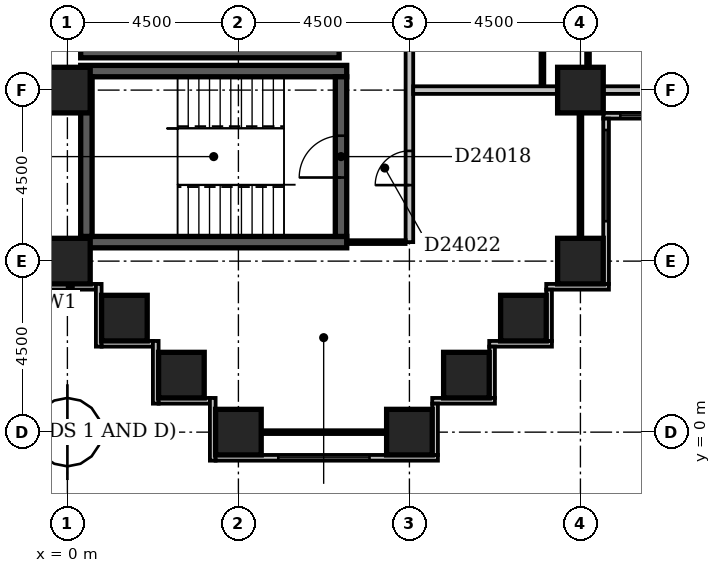
"""IFC4 building model, lengths in metres.
Left out: names, types, materials, properties, quantities, classifications, styles, units other than length and angle.
Written with IfcOpenShell. Run it as: python <this file> out.ifc"""

import sys

from ifc_helpers import new_model, si_unit, direction, frame, frame_2d, origin, origin_2d, place, context, subcontext, project, spatial, rectangle, extrude, element, fill, save


model = new_model("IFC4")
c1 = context("Model", 3, precision=1e-05, world=origin(), true_north=direction((0.0, 1.0)))
c2 = subcontext(c1, "Body", "Model", "MODEL_VIEW")
j1 = project(units=[si_unit("LENGTHUNIT", "METRE"), si_unit("PLANEANGLEUNIT", "RADIAN")], contexts=[c1])
p1 = place(None, origin())
s1 = spatial("IfcSite", under=j1, at=p1, CompositionType="ELEMENT")
p2 = place(p1, origin())
s2 = spatial("IfcBuilding", under=s1, at=p2, CompositionType="ELEMENT")
p3 = place(p2, frame((0.0, 0.0, 97.4)))
s3 = spatial("IfcBuildingStorey", under=s2, at=p3, CompositionType="ELEMENT", Elevation=97.4)
for number, where, z_axis, x_axis in (
    (1, (0.35, 5.0, -0.3), (0.0, 0.0, 1.0), (1.0, 0.0, 0.0)),
    (2, (0.35, 9.5, -0.3), (0.0, 0.0, 1.0), (1.0, 0.0, 0.0)),
):
    element("IfcWall", number, at=place(p3, frame(where, z_axis=z_axis, x_axis=x_axis)), inside=s3, PredefinedType="SHEAR", context=c2, shape_type="SweptSolid", body=[
        extrude(rectangle(XDim=7.0, YDim=0.3, at=frame_2d((3.5, 0.0))), origin(), (0.0, 0.0, 1.0), 3.6),
    ])
p4 = place(p3, frame((0.35, 10.0, -0.3), z_axis=(0.0, 0.0, 1.0), x_axis=(1.0, 0.0, 0.0)))
e3 = element("IfcWall", 3, at=p4, inside=s3, PredefinedType="SHEAR", context=c2, shape_type="SweptSolid", body=[
    extrude(rectangle(XDim=6.8, YDim=0.3, at=frame_2d((3.4, 0.0))), origin(), (0.0, 0.0, 1.0), 3.6),
])
p5 = place(p3, frame((0.5, 5.15, -0.3), z_axis=(0.0, 0.0, 1.0), x_axis=(0.0, 1.0, 0.0)))
e4 = element("IfcWall", 4, at=p5, inside=s3, PredefinedType="SHEAR", context=c2, shape_type="SweptSolid", body=[
    extrude(rectangle(XDim=4.2, YDim=0.3, at=frame_2d((2.1, 0.0))), origin(), (0.0, 0.0, 1.0), 3.6),
])
p6 = place(p3, frame((7.2, 5.15, -0.3), z_axis=(0.0, 0.0, 1.0), x_axis=(0.0, 1.0, 0.0)))
e5 = element("IfcWall", 5, at=p6, inside=s3, PredefinedType="SHEAR", context=c2, shape_type="SweptSolid", body=[
    extrude(rectangle(XDim=4.2, YDim=0.3, at=frame_2d((2.1, 0.0))), origin(), (0.0, 0.0, 1.0), 3.6),
])
p7 = place(p6, frame((1.55, 0.0, 0.3)))
e6 = element("IfcOpeningElement", 6, at=p7, cuts=e5, PredefinedType="OPENING", context=c2, shape_type="SweptSolid", body=[
    extrude(rectangle(XDim=1.1, YDim=2.1, at=frame_2d((0.55, 1.05))), frame((0.0, 0.162, 0.0), z_axis=(0.0, -1.0, 0.0), x_axis=(1.0, 0.0, 0.0)), (0.0, 0.0, 1.0), 0.324),
])
for number, where, z_axis, x_axis in (
    (7, (4.5, 0.0, -0.3), (0.0, 0.0, 1.0), (1.0, 0.0, 0.0)),
    (8, (9.0, 0.0, -0.3), (0.0, 0.0, 1.0), (1.0, 0.0, 0.0)),
    (9, (3.0, 1.5, -0.3), (0.0, 0.0, 1.0), (1.0, 0.0, 0.0)),
    (10, (10.5, 1.5, -0.3), (0.0, 0.0, 1.0), (1.0, 0.0, 0.0)),
    (11, (1.5, 3.0, -0.3), (0.0, 0.0, 1.0), (1.0, 0.0, 0.0)),
    (12, (12.0, 3.0, -0.3), (0.0, 0.0, 1.0), (1.0, 0.0, 0.0)),
    (13, (0.0, 4.5, -0.3), (0.0, 0.0, 1.0), (1.0, 0.0, 0.0)),
    (14, (13.5, 4.5, -0.3), (0.0, 0.0, 1.0), (1.0, 0.0, 0.0)),
    (15, (0.0, 9.0, -0.3), (0.0, 0.0, 1.0), (1.0, 0.0, 0.0)),
    (16, (13.5, 9.0, -0.3), (0.0, 0.0, 1.0), (1.0, 0.0, 0.0)),
):
    element("IfcColumn", number, at=place(p3, frame(where, z_axis=z_axis, x_axis=x_axis)), inside=s3, PredefinedType="COLUMN", context=c2, shape_type="SweptSolid", body=[
        extrude(rectangle(XDim=1.2, YDim=1.2, at=origin_2d()), origin(), (0.0, 0.0, 1.0), 3.6),
    ])
p8 = place(p3, frame((9.675, -0.6, 0.0), z_axis=(0.0, 0.0, 1.0), x_axis=(0.0, 1.0, 0.0)))
e17 = element("IfcWall", 17, at=p8, inside=s3, PredefinedType="STANDARD", context=c2, shape_type="SweptSolid", body=[
    extrude(rectangle(XDim=1.35, YDim=0.15, at=frame_2d((0.675, 0.0))), origin(), (0.0, 0.0, 1.0), 2.7),
])
p9 = place(p3, frame((9.6, 0.825, 0.0), z_axis=(0.0, 0.0, 1.0), x_axis=(1.0, 0.0, 0.0)))
e18 = element("IfcWall", 18, at=p9, inside=s3, PredefinedType="STANDARD", context=c2, shape_type="SweptSolid", body=[
    extrude(rectangle(XDim=1.65, YDim=0.15, at=frame_2d((0.825, 0.0))), origin(), (0.0, 0.0, 1.0), 2.7),
])
p10 = place(p3, frame((11.175, 0.9, 0.0), z_axis=(0.0, 0.0, 1.0), x_axis=(0.0, 1.0, 0.0)))
e19 = element("IfcWall", 19, at=p10, inside=s3, PredefinedType="STANDARD", context=c2, shape_type="SweptSolid", body=[
    extrude(rectangle(XDim=1.35, YDim=0.15, at=frame_2d((0.675, 0.0))), origin(), (0.0, 0.0, 1.0), 2.7),
])
p11 = place(p3, frame((11.1, 2.325, 0.0), z_axis=(0.0, 0.0, 1.0), x_axis=(1.0, 0.0, 0.0)))
e20 = element("IfcWall", 20, at=p11, inside=s3, PredefinedType="STANDARD", context=c2, shape_type="SweptSolid", body=[
    extrude(rectangle(XDim=1.65, YDim=0.15, at=frame_2d((0.825, 0.0))), origin(), (0.0, 0.0, 1.0), 2.7),
])
p12 = place(p3, frame((12.675, 2.4, 0.0), z_axis=(0.0, 0.0, 1.0), x_axis=(0.0, 1.0, 0.0)))
e21 = element("IfcWall", 21, at=p12, inside=s3, PredefinedType="STANDARD", context=c2, shape_type="SweptSolid", body=[
    extrude(rectangle(XDim=1.35, YDim=0.15, at=frame_2d((0.675, 0.0))), origin(), (0.0, 0.0, 1.0), 2.7),
])
p13 = place(p3, frame((12.6, 3.825, 0.0), z_axis=(0.0, 0.0, 1.0), x_axis=(1.0, 0.0, 0.0)))
e22 = element("IfcWall", 22, at=p13, inside=s3, PredefinedType="STANDARD", context=c2, shape_type="SweptSolid", body=[
    extrude(rectangle(XDim=1.65, YDim=0.15, at=frame_2d((0.825, 0.0))), origin(), (0.0, 0.0, 1.0), 2.7),
])
p14 = place(p3, frame((14.175, 3.9, 0.0), z_axis=(0.0, 0.0, 1.0), x_axis=(0.0, 1.0, 0.0)))
e23 = element("IfcWall", 23, at=p14, inside=s3, PredefinedType="STANDARD", context=c2, shape_type="SweptSolid", body=[
    extrude(rectangle(XDim=4.35, YDim=0.15, at=frame_2d((2.175, 0.0))), origin(), (0.0, 0.0, 1.0), 2.7),
])
p15 = place(p14, frame((1.65, 0.0, 0.6)))
e24 = element("IfcOpeningElement", 24, at=p15, cuts=e23, PredefinedType="OPENING", context=c2, shape_type="SweptSolid", body=[
    extrude(rectangle(XDim=2.4, YDim=1.8, at=frame_2d((1.2, 0.9))), frame((0.0, 0.087, 0.0), z_axis=(0.0, -1.0, 0.0), x_axis=(1.0, 0.0, 0.0)), (0.0, 0.0, 1.0), 0.174),
])
p16 = place(p3, frame((14.1, 8.325, 0.0), z_axis=(0.0, 0.0, 1.0), x_axis=(1.0, 0.0, 0.0)))
e25 = element("IfcWall", 25, at=p16, inside=s3, PredefinedType="STANDARD", context=c2, shape_type="SweptSolid", body=[
    extrude(rectangle(XDim=4.65, YDim=0.15, at=frame_2d((2.325, 0.0))), origin(), (0.0, 0.0, 1.0), 2.7),
])
p17 = place(p16, frame((0.45, 0.0, 0.6)))
e26 = element("IfcOpeningElement", 26, at=p17, cuts=e25, PredefinedType="OPENING", context=c2, shape_type="SweptSolid", body=[
    extrude(rectangle(XDim=2.4, YDim=1.8, at=frame_2d((1.2, 0.9))), frame((0.0, 0.087, 0.0), z_axis=(0.0, -1.0, 0.0), x_axis=(1.0, 0.0, 0.0)), (0.0, 0.0, 1.0), 0.174),
])
p18 = place(p3, frame((-0.6, 3.825, 0.0), z_axis=(0.0, 0.0, 1.0), x_axis=(1.0, 0.0, 0.0)))
e27 = element("IfcWall", 27, at=p18, inside=s3, PredefinedType="STANDARD", context=c2, shape_type="SweptSolid", body=[
    extrude(rectangle(XDim=1.35, YDim=0.15, at=frame_2d((0.675, 0.0))), origin(), (0.0, 0.0, 1.0), 2.7),
])
p19 = place(p3, frame((0.825, 3.9, 0.0), z_axis=(0.0, 0.0, 1.0), x_axis=(0.0, -1.0, 0.0)))
e28 = element("IfcWall", 28, at=p19, inside=s3, PredefinedType="STANDARD", context=c2, shape_type="SweptSolid", body=[
    extrude(rectangle(XDim=1.65, YDim=0.15, at=frame_2d((0.825, 0.0))), origin(), (0.0, 0.0, 1.0), 2.7),
])
p20 = place(p3, frame((0.9, 2.325, 0.0), z_axis=(0.0, 0.0, 1.0), x_axis=(1.0, 0.0, 0.0)))
e29 = element("IfcWall", 29, at=p20, inside=s3, PredefinedType="STANDARD", context=c2, shape_type="SweptSolid", body=[
    extrude(rectangle(XDim=1.35, YDim=0.15, at=frame_2d((0.675, 0.0))), origin(), (0.0, 0.0, 1.0), 2.7),
])
p21 = place(p3, frame((2.325, 2.4, 0.0), z_axis=(0.0, 0.0, 1.0), x_axis=(0.0, -1.0, 0.0)))
e30 = element("IfcWall", 30, at=p21, inside=s3, PredefinedType="STANDARD", context=c2, shape_type="SweptSolid", body=[
    extrude(rectangle(XDim=1.65, YDim=0.15, at=frame_2d((0.825, 0.0))), origin(), (0.0, 0.0, 1.0), 2.7),
])
p22 = place(p3, frame((2.4, 0.825, 0.0), z_axis=(0.0, 0.0, 1.0), x_axis=(1.0, 0.0, 0.0)))
e31 = element("IfcWall", 31, at=p22, inside=s3, PredefinedType="STANDARD", context=c2, shape_type="SweptSolid", body=[
    extrude(rectangle(XDim=1.35, YDim=0.15, at=frame_2d((0.675, 0.0))), origin(), (0.0, 0.0, 1.0), 2.7),
])
p23 = place(p3, frame((3.825, 0.9, 0.0), z_axis=(0.0, 0.0, 1.0), x_axis=(0.0, -1.0, 0.0)))
e32 = element("IfcWall", 32, at=p23, inside=s3, PredefinedType="STANDARD", context=c2, shape_type="SweptSolid", body=[
    extrude(rectangle(XDim=1.65, YDim=0.15, at=frame_2d((0.825, 0.0))), origin(), (0.0, 0.0, 1.0), 2.7),
])
p24 = place(p3, frame((3.9, -0.675, 0.0), z_axis=(0.0, 0.0, 1.0), x_axis=(1.0, 0.0, 0.0)))
e33 = element("IfcWall", 33, at=p24, inside=s3, PredefinedType="STANDARD", context=c2, shape_type="SweptSolid", body=[
    extrude(rectangle(XDim=5.85, YDim=0.15, at=frame_2d((2.925, 0.0))), origin(), (0.0, 0.0, 1.0), 2.7),
])
p25 = place(p24, frame((1.65, 0.0, 0.6)))
e34 = element("IfcOpeningElement", 34, at=p25, cuts=e33, PredefinedType="OPENING", context=c2, shape_type="SweptSolid", body=[
    extrude(rectangle(XDim=2.4, YDim=1.8, at=frame_2d((1.2, 0.9))), frame((0.0, 0.087, 0.0), z_axis=(0.0, -1.0, 0.0), x_axis=(1.0, 0.0, 0.0)), (0.0, 0.0, 1.0), 0.174),
])
p26 = place(p3, frame((5.1, 0.0, 0.0), z_axis=(0.0, 0.0, 1.0), x_axis=(1.0, 0.0, 0.0)))
e35 = element("IfcWall", 35, at=p26, inside=s3, PredefinedType="PARTITIONING", context=c2, shape_type="SweptSolid", body=[
    extrude(rectangle(XDim=3.3, YDim=0.1, at=frame_2d((1.65, 0.0))), origin(), (0.0, 0.0, 1.0), 2.7),
])
p27 = place(p3, frame((0.0, 4.4, 0.0), z_axis=(0.0, 0.0, 1.0), x_axis=(0.0, 1.0, 0.0)))
e36 = element("IfcWall", 36, at=p27, inside=s3, PredefinedType="PARTITIONING", context=c2, shape_type="SweptSolid", body=[
    extrude(rectangle(XDim=0.7, YDim=0.1, at=frame_2d((0.35, 0.0))), origin(), (0.0, 0.0, 1.0), 2.7),
])
p28 = place(p3, frame((7.349, 5.0, 0.0), z_axis=(0.0, 0.0, 1.0), x_axis=(1.0, 0.0, 0.0)))
e37 = element("IfcWall", 37, at=p28, inside=s3, PredefinedType="PARTITIONING", context=c2, shape_type="SweptSolid", body=[
    extrude(rectangle(XDim=1.551, YDim=0.1, at=frame_2d((0.775, 0.0))), origin(), (0.0, 0.0, 1.0), 3.3),
])
p29 = place(p3, frame((9.0, 5.0, 0.0), z_axis=(0.0, 0.0, 1.0), x_axis=(0.0, 1.0, 0.0)))
e38 = element("IfcWall", 38, at=p29, inside=s3, PredefinedType="PARTITIONING", context=c2, shape_type="SweptSolid", body=[
    extrude(rectangle(XDim=44.5, YDim=0.2, at=frame_2d((22.25, 0.0))), origin(), (0.0, 0.0, 1.0), 3.3),
])
p30 = place(p29, frame((18.4, 0.0, 0.0)))
e39 = element("IfcOpeningElement", 39, at=p30, cuts=e38, PredefinedType="OPENING", context=c2, shape_type="SweptSolid", body=[
    extrude(rectangle(XDim=1.0, YDim=2.1, at=frame_2d((0.5, 1.05))), frame((0.0, 0.112, 0.0), z_axis=(0.0, -1.0, 0.0), x_axis=(1.0, 0.0, 0.0)), (0.0, 0.0, 1.0), 0.224),
])
p31 = place(p29, frame((11.7, 0.0, 0.0)))
e40 = element("IfcOpeningElement", 40, at=p31, cuts=e38, PredefinedType="OPENING", context=c2, shape_type="SweptSolid", body=[
    extrude(rectangle(XDim=1.0, YDim=2.1, at=frame_2d((0.5, 1.05))), frame((0.0, 0.112, 0.0), z_axis=(0.0, -1.0, 0.0), x_axis=(1.0, 0.0, 0.0)), (0.0, 0.0, 1.0), 0.224),
])
p32 = place(p29, frame((37.25, 0.0, 0.0)))
e41 = element("IfcOpeningElement", 41, at=p32, cuts=e38, PredefinedType="OPENING", context=c2, shape_type="SweptSolid", body=[
    extrude(rectangle(XDim=0.9, YDim=2.1, at=frame_2d((0.45, 1.05))), frame((0.0, 0.112, 0.0), z_axis=(0.0, -1.0, 0.0), x_axis=(1.0, 0.0, 0.0)), (0.0, 0.0, 1.0), 0.224),
])
p33 = place(p29, frame((1.5, 0.0, 0.0)))
e42 = element("IfcOpeningElement", 42, at=p33, cuts=e38, PredefinedType="OPENING", context=c2, shape_type="SweptSolid", body=[
    extrude(rectangle(XDim=0.9, YDim=2.1, at=frame_2d((0.45, 1.05))), frame((0.0, 0.112, 0.0), z_axis=(0.0, -1.0, 0.0), x_axis=(1.0, 0.0, 0.0)), (0.0, 0.0, 1.0), 0.224),
])
p34 = place(p3, frame((13.5, 5.1, 0.0), z_axis=(0.0, 0.0, 1.0), x_axis=(0.0, 1.0, 0.0)))
e43 = element("IfcWall", 43, at=p34, inside=s3, PredefinedType="PARTITIONING", context=c2, shape_type="SweptSolid", body=[
    extrude(rectangle(XDim=3.3, YDim=0.1, at=frame_2d((1.65, 0.0))), origin(), (0.0, 0.0, 1.0), 2.7),
])
p35 = place(p3, frame((9.1, 9.0, 0.0), z_axis=(0.0, 0.0, 1.0), x_axis=(1.0, 0.0, 0.0)))
e44 = element("IfcWall", 44, at=p35, inside=s3, PredefinedType="PARTITIONING", context=c2, shape_type="SweptSolid", body=[
    extrude(rectangle(XDim=3.8, YDim=0.2, at=frame_2d((1.9, 0.0))), origin(), (0.0, 0.0, 1.0), 3.3),
])
p36 = place(p3, frame((14.1, 9.0, 0.0), z_axis=(0.0, 0.0, 1.0), x_axis=(1.0, 0.0, 0.0)))
e45 = element("IfcWall", 45, at=p36, inside=s3, PredefinedType="PARTITIONING", context=c2, shape_type="SweptSolid", body=[
    extrude(rectangle(XDim=3.3, YDim=0.2, at=frame_2d((1.65, 0.0))), origin(), (0.0, 0.0, 1.0), 2.7),
])
p37 = place(p3, frame((12.5, 9.1, 0.0), z_axis=(0.0, 0.0, 1.0), x_axis=(0.0, 1.0, 0.0)))
e46 = element("IfcWall", 46, at=p37, inside=s3, PredefinedType="PARTITIONING", context=c2, shape_type="SweptSolid", body=[
    extrude(rectangle(XDim=7.3, YDim=0.1, at=frame_2d((3.65, 0.0))), origin(), (0.0, 0.0, 1.0), 3.3),
])
p38 = place(p37, frame((5.7, 0.0, 0.0)))
e47 = element("IfcOpeningElement", 47, at=p38, cuts=e46, PredefinedType="OPENING", context=c2, shape_type="SweptSolid", body=[
    extrude(rectangle(XDim=0.8, YDim=2.1, at=frame_2d((0.4, 1.05))), frame((0.0, 0.062, 0.0), z_axis=(0.0, -1.0, 0.0), x_axis=(1.0, 0.0, 0.0)), (0.0, 0.0, 1.0), 0.124),
])
p39 = place(p37, frame((1.95, 0.0, 0.0)))
e48 = element("IfcOpeningElement", 48, at=p39, cuts=e46, PredefinedType="OPENING", context=c2, shape_type="SweptSolid", body=[
    extrude(rectangle(XDim=0.9, YDim=2.1, at=frame_2d((0.45, 1.05))), frame((0.0, 0.062, 0.0), z_axis=(0.0, -1.0, 0.0), x_axis=(1.0, 0.0, 0.0)), (0.0, 0.0, 1.0), 0.124),
])
p40 = place(p3, frame((13.7, 9.6, 0.0), z_axis=(0.0, 0.0, 1.0), x_axis=(0.0, 1.0, 0.0)))
e49 = element("IfcWall", 49, at=p40, inside=s3, PredefinedType="PARTITIONING", context=c2, shape_type="SweptSolid", body=[
    extrude(rectangle(XDim=8.3, YDim=0.1, at=frame_2d((4.15, 0.0))), origin(), (0.0, 0.0, 1.0), 3.3),
])
p41 = place(p40, frame((1.2, 0.0, 0.0)))
e50 = element("IfcOpeningElement", 50, at=p41, cuts=e49, PredefinedType="OPENING", context=c2, shape_type="SweptSolid", body=[
    extrude(rectangle(XDim=0.9, YDim=2.1, at=frame_2d((0.45, 1.05))), frame((0.0, 0.062, 0.0), z_axis=(0.0, -1.0, 0.0), x_axis=(1.0, 0.0, 0.0)), (0.0, 0.0, 1.0), 0.124),
])
p42 = place(p40, frame((5.7, 0.0, 0.0)))
e51 = element("IfcOpeningElement", 51, at=p42, cuts=e49, PredefinedType="OPENING", context=c2, shape_type="SweptSolid", body=[
    extrude(rectangle(XDim=0.9, YDim=2.1, at=frame_2d((0.45, 1.05))), frame((0.0, 0.062, 0.0), z_axis=(0.0, -1.0, 0.0), x_axis=(1.0, 0.0, 0.0)), (0.0, 0.0, 1.0), 0.124),
])
p43 = place(p15, origin())
e52 = element("IfcWindow", 52, at=p43, inside=s3, PartitioningType="SINGLE_PANEL", PredefinedType="WINDOW", context=c2, shape_type="SweptSolid", body=[
    extrude(rectangle(XDim=2.4, YDim=1.8, at=frame_2d((1.2, 0.9))), frame((0.0, 0.03, 0.0), z_axis=(0.0, -1.0, 0.0), x_axis=(1.0, 0.0, 0.0)), (0.0, 0.0, 1.0), 0.06),
])
fill(e24, e52)
p44 = place(p17, origin())
e53 = element("IfcWindow", 53, at=p44, inside=s3, PartitioningType="SINGLE_PANEL", PredefinedType="WINDOW", context=c2, shape_type="SweptSolid", body=[
    extrude(rectangle(XDim=2.4, YDim=1.8, at=frame_2d((1.2, 0.9))), frame((0.0, 0.03, 0.0), z_axis=(0.0, -1.0, 0.0), x_axis=(1.0, 0.0, 0.0)), (0.0, 0.0, 1.0), 0.06),
])
fill(e26, e53)
p45 = place(p25, origin())
e54 = element("IfcWindow", 54, at=p45, inside=s3, PartitioningType="SINGLE_PANEL", PredefinedType="WINDOW", context=c2, shape_type="SweptSolid", body=[
    extrude(rectangle(XDim=2.4, YDim=1.8, at=frame_2d((1.2, 0.9))), frame((0.0, 0.03, 0.0), z_axis=(0.0, -1.0, 0.0), x_axis=(1.0, 0.0, 0.0)), (0.0, 0.0, 1.0), 0.06),
])
fill(e34, e54)
p46 = place(p7, origin())
e55 = element("IfcDoor", 55, at=p46, inside=s3, OperationType="SINGLE_SWING_LEFT", PredefinedType="DOOR", context=c2, shape_type="SweptSolid", body=[
    extrude(rectangle(XDim=1.1, YDim=2.1, at=frame_2d((0.55, 1.05))), frame((0.0, 0.025, 0.0), z_axis=(0.0, -1.0, 0.0), x_axis=(1.0, 0.0, 0.0)), (0.0, 0.0, 1.0), 0.05),
])
fill(e6, e55)
p47 = place(p33, origin())
e56 = element("IfcDoor", 56, at=p47, inside=s3, OperationType="SINGLE_SWING_LEFT", PredefinedType="DOOR", context=c2, shape_type="SweptSolid", body=[
    extrude(rectangle(XDim=0.9, YDim=2.1, at=frame_2d((0.45, 1.05))), frame((0.0, 0.025, 0.0), z_axis=(0.0, -1.0, 0.0), x_axis=(1.0, 0.0, 0.0)), (0.0, 0.0, 1.0), 0.05),
])
fill(e42, e56)
save(model, sys.argv[1])
